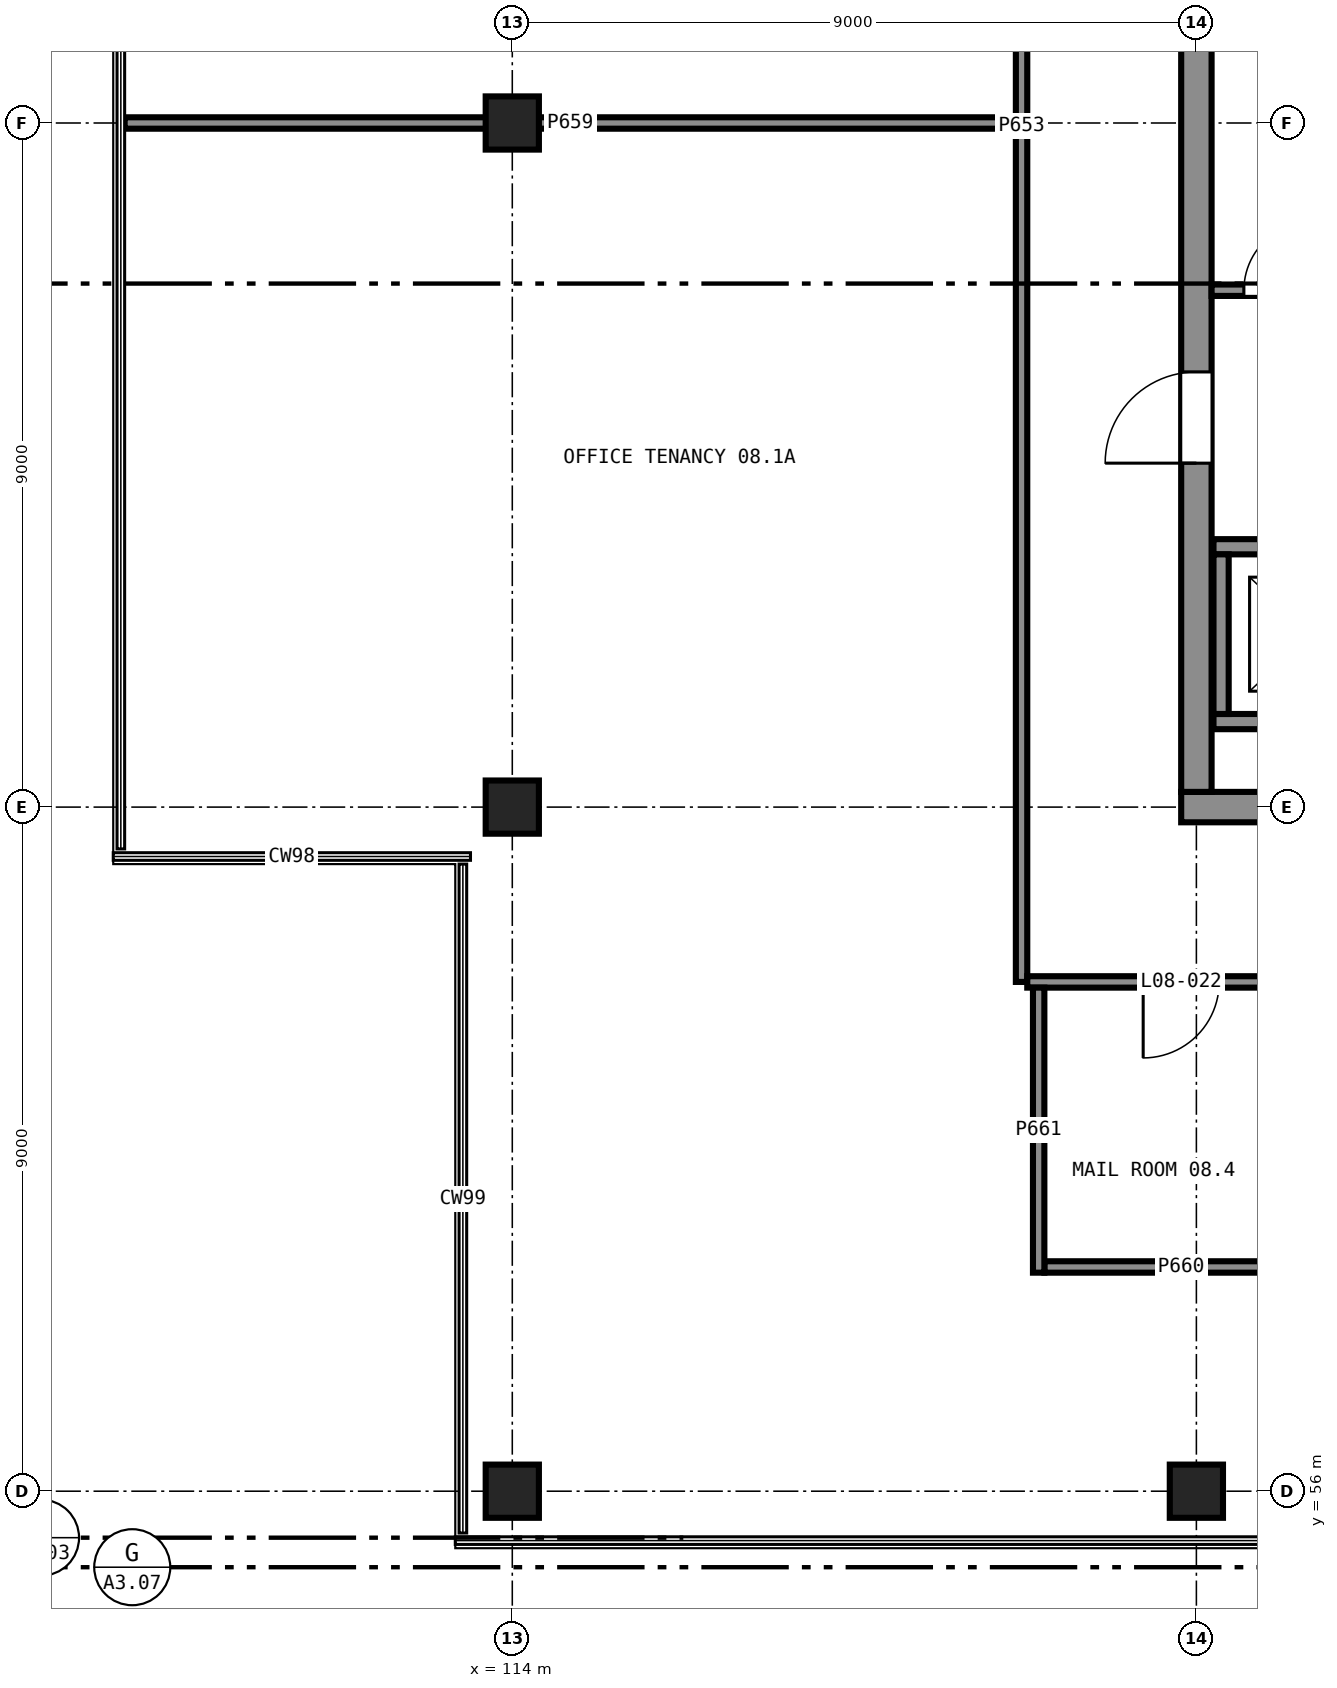
"""IFC4 building model, lengths in metres.
Left out: names, types, materials, properties, quantities, classifications, styles, units other than length and angle.
Written with IfcOpenShell. Run it as: python <this file> out.ifc"""

import sys

from ifc_helpers import new_model, si_unit, direction, frame, frame_2d, origin, origin_2d, place, context, subcontext, project, spatial, rectangle, extrude, element, fill, save


model = new_model("IFC4")
c1 = context("Model", 3, precision=1e-05, world=origin(), true_north=direction((0.0, 1.0)))
c2 = subcontext(c1, "Body", "Model", "MODEL_VIEW")
j1 = project(units=[si_unit("LENGTHUNIT", "METRE"), si_unit("PLANEANGLEUNIT", "RADIAN")], contexts=[c1])
p1 = place(None, origin())
s1 = spatial("IfcSite", under=j1, at=p1, CompositionType="ELEMENT")
p2 = place(p1, origin())
s2 = spatial("IfcBuilding", under=s1, at=p2, CompositionType="ELEMENT")
p3 = place(p2, frame((0.0, 0.0, 33.5)))
s3 = spatial("IfcBuildingStorey", under=s2, at=p3, CompositionType="ELEMENT", Elevation=33.5)
for number, where, z_axis, x_axis in (
    (1, (114.0, 56.0, 0.0), (0.0, 0.0, 1.0), (1.0, 0.0, 0.0)),
    (2, (114.0, 65.0, 0.0), (0.0, 0.0, 1.0), (1.0, 0.0, 0.0)),
    (3, (114.0, 74.0, 0.0), (0.0, 0.0, 1.0), (1.0, 0.0, 0.0)),
    (4, (123.0, 56.0, 0.0), (0.0, 0.0, 1.0), (1.0, 0.0, 0.0)),
):
    element("IfcColumn", number, at=place(p3, frame(where, z_axis=z_axis, x_axis=x_axis)), inside=s3, PredefinedType="COLUMN", context=c2, shape_type="SweptSolid", body=[
        extrude(rectangle(XDim=0.7, YDim=0.7, at=origin_2d()), origin(), (0.0, 0.0, 1.0), 4.0),
    ])
p4 = place(p3, frame((122.8, 65.0, 0.0), z_axis=(0.0, 0.0, 1.0), x_axis=(1.0, 0.0, 0.0)))
e5 = element("IfcWall", 5, at=p4, inside=s3, PredefinedType="SHEAR", context=c2, shape_type="SweptSolid", body=[
    extrude(rectangle(XDim=18.4, YDim=0.4, at=frame_2d((9.2, 0.0))), origin(), (0.0, 0.0, 1.0), 4.0),
])
p5 = place(p3, frame((123.0, 82.8, 0.0), z_axis=(0.0, 0.0, 1.0), x_axis=(0.0, -1.0, 0.0)))
e6 = element("IfcWall", 6, at=p5, inside=s3, PredefinedType="SHEAR", context=c2, shape_type="SweptSolid", body=[
    extrude(rectangle(XDim=17.6, YDim=0.4, at=frame_2d((8.8, 0.0))), origin(), (0.0, 0.0, 1.0), 4.0),
])
p6 = place(p5, frame((12.075, 0.0, 0.0)))
e7 = element("IfcOpeningElement", 7, at=p6, cuts=e6, PredefinedType="OPENING", context=c2, shape_type="SweptSolid", body=[
    extrude(rectangle(XDim=1.2, YDim=2.1, at=frame_2d((0.6, 1.05))), frame((0.0, 0.21, 0.0), z_axis=(0.0, -1.0, 0.0), x_axis=(1.0, 0.0, 0.0)), (0.0, 0.0, 1.0), 0.42),
])
p7 = place(p5, frame((4.325, 0.0, 0.0)))
e8 = element("IfcOpeningElement", 8, at=p7, cuts=e6, PredefinedType="OPENING", context=c2, shape_type="SweptSolid", body=[
    extrude(rectangle(XDim=1.2, YDim=2.1, at=frame_2d((0.6, 1.05))), frame((0.0, 0.21, 0.0), z_axis=(0.0, -1.0, 0.0), x_axis=(1.0, 0.0, 0.0)), (0.0, 0.0, 1.0), 0.42),
])
p8 = place(p3, frame((123.225, 66.125, 0.0), z_axis=(0.0, 0.0, 1.0), x_axis=(1.0, 0.0, 0.0)))
e9 = element("IfcWall", 9, at=p8, inside=s3, PredefinedType="SHEAR", context=c2, shape_type="SweptSolid", body=[
    extrude(rectangle(XDim=2.55, YDim=0.2, at=frame_2d((1.275, 0.0))), origin(), (0.0, 0.0, 1.0), 4.0),
])
p9 = place(p3, frame((125.775, 68.425, 0.0), z_axis=(0.0, 0.0, 1.0), x_axis=(-1.0, 0.0, 0.0)))
e10 = element("IfcWall", 10, at=p9, inside=s3, PredefinedType="SHEAR", context=c2, shape_type="SweptSolid", body=[
    extrude(rectangle(XDim=2.55, YDim=0.2, at=frame_2d((1.275, 0.0))), origin(), (0.0, 0.0, 1.0), 4.0),
])
p10 = place(p9, frame((0.725, 0.0, 0.0)))
e11 = element("IfcOpeningElement", 11, at=p10, cuts=e10, PredefinedType="OPENING", context=c2, shape_type="SweptSolid", body=[
    extrude(rectangle(XDim=1.1, YDim=2.1, at=frame_2d((0.55, 1.05))), frame((0.0, 0.11, 0.0), z_axis=(0.0, -1.0, 0.0), x_axis=(1.0, 0.0, 0.0)), (0.0, 0.0, 1.0), 0.22),
])
p11 = place(p3, frame((123.325, 68.325, 0.0), z_axis=(0.0, 0.0, 1.0), x_axis=(0.0, -1.0, 0.0)))
e12 = element("IfcWall", 12, at=p11, inside=s3, PredefinedType="SHEAR", context=c2, shape_type="SweptSolid", body=[
    extrude(rectangle(XDim=2.1, YDim=0.2, at=frame_2d((1.05, 0.0))), origin(), (0.0, 0.0, 1.0), 4.0),
])
p12 = place(p3, frame((123.2, 71.8, 0.0), z_axis=(0.0, 0.0, 1.0), x_axis=(1.0, 0.0, 0.0)))
e13 = element("IfcWall", 13, at=p12, inside=s3, PredefinedType="PARTITIONING", context=c2, shape_type="SweptSolid", body=[
    extrude(rectangle(XDim=1.65, YDim=0.15, at=frame_2d((0.825, 0.0))), origin(), (0.0, 0.0, 1.0), 3.75),
])
p13 = place(p12, frame((0.425, 0.0, 0.0)))
e14 = element("IfcOpeningElement", 14, at=p13, cuts=e13, PredefinedType="OPENING", context=c2, shape_type="SweptSolid", body=[
    extrude(rectangle(XDim=0.9, YDim=2.1, at=frame_2d((0.45, 1.05))), frame((0.0, 0.085, 0.0), z_axis=(0.0, -1.0, 0.0), x_axis=(1.0, 0.0, 0.0)), (0.0, 0.0, 1.0), 0.17),
])
p14 = place(p3, frame((120.7, 62.7, 0.0), z_axis=(0.0, 0.0, 1.0), x_axis=(0.0, 1.0, 0.0)))
e15 = element("IfcWall", 15, at=p14, inside=s3, PredefinedType="PARTITIONING", context=c2, shape_type="SweptSolid", body=[
    extrude(rectangle(XDim=22.525, YDim=0.15, at=frame_2d((11.263, 0.0))), origin(), (0.0, 0.0, 1.0), 3.75),
])
p15 = place(p14, frame((16.435, 0.0, 0.0)))
e16 = element("IfcOpeningElement", 16, at=p15, cuts=e15, PredefinedType="OPENING", context=c2, shape_type="SweptSolid", body=[
    extrude(rectangle(XDim=1.0, YDim=2.1, at=frame_2d((0.5, 1.05))), frame((0.0, 0.085, 0.0), z_axis=(0.0, -1.0, 0.0), x_axis=(1.0, 0.0, 0.0)), (0.0, 0.0, 1.0), 0.17),
])
p16 = place(p3, frame((132.6, 62.7, 0.0), z_axis=(0.0, 0.0, 1.0), x_axis=(-1.0, 0.0, 0.0)))
e17 = element("IfcWall", 17, at=p16, inside=s3, PredefinedType="PARTITIONING", context=c2, shape_type="SweptSolid", body=[
    extrude(rectangle(XDim=11.825, YDim=0.15, at=frame_2d((5.913, 0.0))), origin(), (0.0, 0.0, 1.0), 3.75),
])
p17 = place(p16, frame((9.3, 0.0, 0.0)))
e18 = element("IfcOpeningElement", 18, at=p17, cuts=e17, PredefinedType="OPENING", context=c2, shape_type="SweptSolid", body=[
    extrude(rectangle(XDim=1.0, YDim=2.1, at=frame_2d((0.5, 1.05))), frame((0.0, 0.085, 0.0), z_axis=(0.0, -1.0, 0.0), x_axis=(1.0, 0.0, 0.0)), (0.0, 0.0, 1.0), 0.17),
])
p18 = place(p16, frame((5.427, 0.0, 0.0)))
e19 = element("IfcOpeningElement", 19, at=p18, cuts=e17, PredefinedType="OPENING", context=c2, shape_type="SweptSolid", body=[
    extrude(rectangle(XDim=1.0, YDim=2.1, at=frame_2d((0.5, 1.05))), frame((0.0, 0.085, 0.0), z_axis=(0.0, -1.0, 0.0), x_axis=(1.0, 0.0, 0.0)), (0.0, 0.0, 1.0), 0.17),
])
p19 = place(p3, frame((108.9, 74.0, 0.0), z_axis=(0.0, 0.0, 1.0), x_axis=(1.0, 0.0, 0.0)))
e20 = element("IfcWall", 20, at=p19, inside=s3, PredefinedType="PARTITIONING", context=c2, shape_type="SweptSolid", body=[
    extrude(rectangle(XDim=11.726, YDim=0.15, at=frame_2d((5.863, 0.0))), origin(), (0.0, 0.0, 1.0), 2.85),
])
p20 = place(p3, frame((121.0, 58.95, 0.0), z_axis=(0.0, 0.0, 1.0), x_axis=(1.0, 0.0, 0.0)))
e21 = element("IfcWall", 21, at=p20, inside=s3, PredefinedType="PARTITIONING", context=c2, shape_type="SweptSolid", body=[
    extrude(rectangle(XDim=3.6, YDim=0.15, at=frame_2d((1.8, 0.0))), origin(), (0.0, 0.0, 1.0), 3.75),
])
p21 = place(p3, frame((120.925, 62.625, 0.0), z_axis=(0.0, 0.0, 1.0), x_axis=(0.0, -1.0, 0.0)))
e22 = element("IfcWall", 22, at=p21, inside=s3, PredefinedType="PARTITIONING", context=c2, shape_type="SweptSolid", body=[
    extrude(rectangle(XDim=3.75, YDim=0.15, at=frame_2d((1.875, 0.0))), origin(), (0.0, 0.0, 1.0), 3.75),
])
p22 = place(p6, frame((1.2, 0.0, 0.0), z_axis=(0.0, 0.0, 1.0), x_axis=(-1.0, 0.0, 0.0)))
e23 = element("IfcDoor", 23, at=p22, inside=s3, OperationType="SINGLE_SWING_RIGHT", PredefinedType="DOOR", context=c2, shape_type="SweptSolid", body=[
    extrude(rectangle(XDim=1.2, YDim=2.1, at=frame_2d((0.6, 1.05))), frame((0.0, 0.025, 0.0), z_axis=(0.0, -1.0, 0.0), x_axis=(1.0, 0.0, 0.0)), (0.0, 0.0, 1.0), 0.05),
])
fill(e7, e23)
p23 = place(p13, origin())
e24 = element("IfcDoor", 24, at=p23, inside=s3, OperationType="SINGLE_SWING_LEFT", PredefinedType="DOOR", context=c2, shape_type="SweptSolid", body=[
    extrude(rectangle(XDim=0.9, YDim=2.1, at=frame_2d((0.45, 1.05))), frame((0.0, 0.025, 0.0), z_axis=(0.0, -1.0, 0.0), x_axis=(1.0, 0.0, 0.0)), (0.0, 0.0, 1.0), 0.05),
])
fill(e14, e24)
p24 = place(p17, origin())
e25 = element("IfcDoor", 25, at=p24, inside=s3, OperationType="SINGLE_SWING_LEFT", PredefinedType="DOOR", context=c2, shape_type="SweptSolid", body=[
    extrude(rectangle(XDim=1.0, YDim=2.1, at=frame_2d((0.5, 1.05))), frame((0.0, 0.025, 0.0), z_axis=(0.0, -1.0, 0.0), x_axis=(1.0, 0.0, 0.0)), (0.0, 0.0, 1.0), 0.05),
])
fill(e18, e25)
save(model, sys.argv[1])
